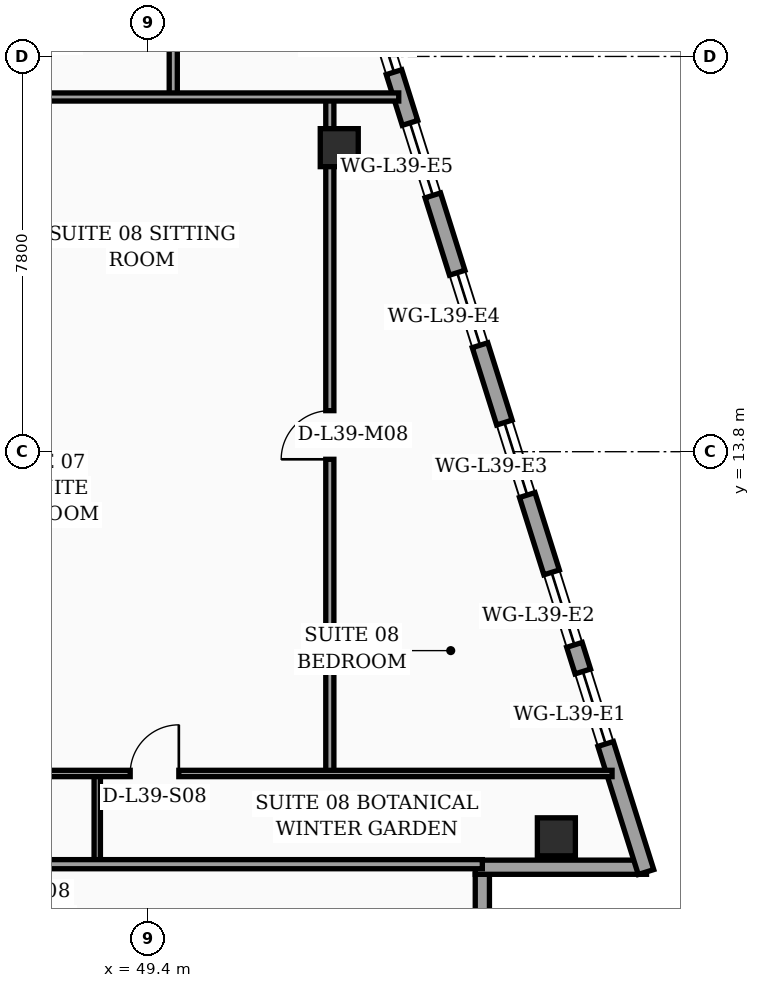
"""IFC4 building model, lengths in metres.
Left out: names, types, materials, properties, quantities, classifications, styles, units other than length and angle.
Written with IfcOpenShell. Run it as: python <this file> out.ifc"""

import sys

from ifc_helpers import new_model, si_unit, direction, frame, frame_2d, origin, origin_2d, place, context, subcontext, project, spatial, rectangle, hollow_rectangle, extrude, element, fill, save


model = new_model("IFC4")
c1 = context("Model", 3, precision=1e-05, world=origin(), true_north=direction((0.0, 1.0)))
c2 = subcontext(c1, "Body", "Model", "MODEL_VIEW")
j1 = project(units=[si_unit("LENGTHUNIT", "METRE"), si_unit("PLANEANGLEUNIT", "RADIAN")], contexts=[c1])
p1 = place(None, origin())
s1 = spatial("IfcSite", under=j1, at=p1, CompositionType="ELEMENT")
p2 = place(p1, origin())
s2 = spatial("IfcBuilding", under=s1, at=p2, CompositionType="ELEMENT")
p3 = place(p2, frame((0.0, 0.0, 159.9)))
s3 = spatial("IfcBuildingStorey", under=s2, at=p3, CompositionType="ELEMENT", Elevation=159.9)
for number, where, z_axis, x_axis in (
    (1, (57.461, 6.2, 0.0), (0.0, 0.0, 1.0), (1.0, 0.0, 0.0)),
    (2, (53.176, 19.8, 0.0), (0.0, 0.0, 1.0), (1.0, 0.0, 0.0)),
):
    element("IfcColumn", number, at=place(p3, frame(where, z_axis=z_axis, x_axis=x_axis)), inside=s3, PredefinedType="COLUMN", context=c2, shape_type="SweptSolid", body=[
        extrude(hollow_rectangle(XDim=0.75, YDim=0.75, WallThickness=0.032, at=origin_2d()), origin(), (0.0, 0.0, 1.0), 3.56),
    ])
p4 = place(p3, frame((56.0, 2.52, 0.0), z_axis=(0.0, 0.0, 1.0), x_axis=(0.0, 1.0, 0.0)))
e3 = element("IfcWall", 3, at=p4, inside=s3, PredefinedType="SOLIDWALL", context=c2, shape_type="SweptSolid", body=[
    extrude(rectangle(XDim=2.94, YDim=0.28, at=frame_2d((1.47, 0.0))), origin(), (0.0, 0.0, 1.0), 3.04),
])
p5 = place(p3, frame((55.86, 5.6, 0.0), z_axis=(0.0, 0.0, 1.0), x_axis=(1.0, 0.0, 0.0)))
e4 = element("IfcWall", 4, at=p5, inside=s3, PredefinedType="SOLIDWALL", context=c2, shape_type="SweptSolid", body=[
    extrude(rectangle(XDim=3.38, YDim=0.28, at=frame_2d((1.69, 0.0))), origin(), (0.0, 0.0, 1.0), 3.04),
])
p6 = place(p3, frame((59.23, 5.505, 0.0), z_axis=(0.0, 0.0, 1.0), x_axis=(-0.300509063924, 0.953778958931, 0.0)))
e5 = element("IfcWall", 5, at=p6, inside=s3, PredefinedType="SOLIDWALL", context=c2, shape_type="SweptSolid", body=[
    extrude(rectangle(XDim=30.814, YDim=0.32, at=frame_2d((15.407, 0.0))), origin(), (0.0, 0.0, 1.0), 3.56),
])
p7 = place(p6, frame((18.796, 0.0, 0.0)))
e6 = element("IfcOpeningElement", 6, at=p7, cuts=e5, PredefinedType="OPENING", context=c2, shape_type="SweptSolid", body=[
    extrude(rectangle(XDim=1.4, YDim=2.25, at=frame_2d((0.7, 1.125))), frame((0.0, 0.17, 0.0), z_axis=(0.0, -1.0, 0.0), x_axis=(1.0, 0.0, 0.0)), (0.0, 0.0, 1.0), 0.34),
])
p8 = place(p6, frame((2.65, 0.0, 0.75)))
e7 = element("IfcOpeningElement", 7, at=p8, cuts=e5, PredefinedType="OPENING", context=c2, shape_type="SweptSolid", body=[
    extrude(rectangle(XDim=1.5, YDim=1.6, at=frame_2d((0.75, 0.8))), frame((0.0, 0.17, 0.0), z_axis=(0.0, -1.0, 0.0), x_axis=(1.0, 0.0, 0.0)), (0.0, 0.0, 1.0), 0.34),
])
p9 = place(p6, frame((4.7, 0.0, 0.75)))
e8 = element("IfcOpeningElement", 8, at=p9, cuts=e5, PredefinedType="OPENING", context=c2, shape_type="SweptSolid", body=[
    extrude(rectangle(XDim=1.5, YDim=1.6, at=frame_2d((0.75, 0.8))), frame((0.0, 0.17, 0.0), z_axis=(0.0, -1.0, 0.0), x_axis=(1.0, 0.0, 0.0)), (0.0, 0.0, 1.0), 0.34),
])
p10 = place(p6, frame((7.8, 0.0, 0.75)))
e9 = element("IfcOpeningElement", 9, at=p10, cuts=e5, PredefinedType="OPENING", context=c2, shape_type="SweptSolid", body=[
    extrude(rectangle(XDim=1.5, YDim=1.6, at=frame_2d((0.75, 0.8))), frame((0.0, 0.17, 0.0), z_axis=(0.0, -1.0, 0.0), x_axis=(1.0, 0.0, 0.0)), (0.0, 0.0, 1.0), 0.34),
])
p11 = place(p6, frame((10.9, 0.0, 0.75)))
e10 = element("IfcOpeningElement", 10, at=p11, cuts=e5, PredefinedType="OPENING", context=c2, shape_type="SweptSolid", body=[
    extrude(rectangle(XDim=1.5, YDim=1.6, at=frame_2d((0.75, 0.8))), frame((0.0, 0.17, 0.0), z_axis=(0.0, -1.0, 0.0), x_axis=(1.0, 0.0, 0.0)), (0.0, 0.0, 1.0), 0.34),
])
p12 = place(p6, frame((14.0, 0.0, 0.75)))
e11 = element("IfcOpeningElement", 11, at=p12, cuts=e5, PredefinedType="OPENING", context=c2, shape_type="SweptSolid", body=[
    extrude(rectangle(XDim=1.5, YDim=1.6, at=frame_2d((0.75, 0.8))), frame((0.0, 0.17, 0.0), z_axis=(0.0, -1.0, 0.0), x_axis=(1.0, 0.0, 0.0)), (0.0, 0.0, 1.0), 0.34),
])
p13 = place(p6, frame((16.55, 0.0, 0.75)))
e12 = element("IfcOpeningElement", 12, at=p13, cuts=e5, PredefinedType="OPENING", context=c2, shape_type="SweptSolid", body=[
    extrude(rectangle(XDim=1.5, YDim=1.6, at=frame_2d((0.75, 0.8))), frame((0.0, 0.17, 0.0), z_axis=(0.0, -1.0, 0.0), x_axis=(1.0, 0.0, 0.0)), (0.0, 0.0, 1.0), 0.34),
])
p14 = place(p6, frame((20.75, 0.0, 0.75)))
e13 = element("IfcOpeningElement", 13, at=p14, cuts=e5, PredefinedType="OPENING", context=c2, shape_type="SweptSolid", body=[
    extrude(rectangle(XDim=1.5, YDim=1.6, at=frame_2d((0.75, 0.8))), frame((0.0, 0.17, 0.0), z_axis=(0.0, -1.0, 0.0), x_axis=(1.0, 0.0, 0.0)), (0.0, 0.0, 1.0), 0.34),
])
p15 = place(p6, frame((26.4, 0.0, 0.75)))
e14 = element("IfcOpeningElement", 14, at=p15, cuts=e5, PredefinedType="OPENING", context=c2, shape_type="SweptSolid", body=[
    extrude(rectangle(XDim=1.5, YDim=1.6, at=frame_2d((0.75, 0.8))), frame((0.0, 0.17, 0.0), z_axis=(0.0, -1.0, 0.0), x_axis=(1.0, 0.0, 0.0)), (0.0, 0.0, 1.0), 0.34),
])
p16 = place(p3, frame((48.4, 5.66, 0.0), z_axis=(0.0, 0.0, 1.0), x_axis=(0.0, 1.0, 0.0)))
e15 = element("IfcWall", 15, at=p16, inside=s3, PredefinedType="PARTITIONING", context=c2, shape_type="SweptSolid", body=[
    extrude(rectangle(XDim=1.79, YDim=0.125, at=frame_2d((0.895, 0.0))), origin(), (0.0, 0.0, 1.0), 2.94),
])
p17 = place(p3, frame((52.99, 7.45, 0.0), z_axis=(0.0, 0.0, 1.0), x_axis=(0.0, 1.0, 0.0)))
e16 = element("IfcWall", 16, at=p17, inside=s3, PredefinedType="PARTITIONING", context=c2, shape_type="SweptSolid", body=[
    extrude(rectangle(XDim=13.35, YDim=0.16, at=frame_2d((6.675, 0.0))), origin(), (0.0, 0.0, 1.0), 2.94),
])
p18 = place(p17, frame((6.2, 0.0, 0.0)))
e17 = element("IfcOpeningElement", 17, at=p18, cuts=e16, PredefinedType="OPENING", context=c2, shape_type="SweptSolid", body=[
    extrude(rectangle(XDim=0.96, YDim=2.2, at=frame_2d((0.48, 1.1))), frame((0.0, 0.09, 0.0), z_axis=(0.0, -1.0, 0.0), x_axis=(1.0, 0.0, 0.0)), (0.0, 0.0, 1.0), 0.18),
])
p19 = place(p3, frame((45.45, 7.45, 0.0), z_axis=(0.0, 0.0, 1.0), x_axis=(1.0, 0.0, 0.0)))
e18 = element("IfcWall", 18, at=p19, inside=s3, PredefinedType="PARTITIONING", context=c2, shape_type="SweptSolid", body=[
    extrude(rectangle(XDim=13.11, YDim=0.125, at=frame_2d((6.555, 0.0))), origin(), (0.0, 0.0, 1.0), 2.94),
])
p20 = place(p19, frame((0.5, 0.0, 0.0)))
e19 = element("IfcOpeningElement", 19, at=p20, cuts=e18, PredefinedType="OPENING", context=c2, shape_type="SweptSolid", body=[
    extrude(rectangle(XDim=0.9, YDim=2.15, at=frame_2d((0.45, 1.075))), frame((0.0, 0.073, 0.0), z_axis=(0.0, -1.0, 0.0), x_axis=(1.0, 0.0, 0.0)), (0.0, 0.0, 1.0), 0.145),
])
p21 = place(p19, frame((3.6, 0.0, 0.0)))
e20 = element("IfcOpeningElement", 20, at=p21, cuts=e18, PredefinedType="OPENING", context=c2, shape_type="SweptSolid", body=[
    extrude(rectangle(XDim=0.96, YDim=2.2, at=frame_2d((0.48, 1.1))), frame((0.0, 0.073, 0.0), z_axis=(0.0, -1.0, 0.0), x_axis=(1.0, 0.0, 0.0)), (0.0, 0.0, 1.0), 0.145),
])
p22 = place(p3, frame((45.45, 5.66, 0.0), z_axis=(0.0, 0.0, 1.0), x_axis=(1.0, 0.0, 0.0)))
e21 = element("IfcWall", 21, at=p22, inside=s3, PredefinedType="PARTITIONING", context=c2, shape_type="SweptSolid", body=[
    extrude(rectangle(XDim=10.55, YDim=0.18, at=frame_2d((5.275, 0.0))), origin(), (0.0, 0.0, 1.0), 2.94),
])
p23 = place(p3, frame((49.9, 20.8, 0.0), z_axis=(0.0, 0.0, 1.0), x_axis=(0.0, 1.0, 0.0)))
e22 = element("IfcWall", 22, at=p23, inside=s3, PredefinedType="PARTITIONING", context=c2, shape_type="SweptSolid", body=[
    extrude(rectangle(XDim=7.35, YDim=0.16, at=frame_2d((3.675, 0.0))), origin(), (0.0, 0.0, 1.0), 3.04),
])
p24 = place(p23, frame((3.19, 0.0, 0.0)))
e23 = element("IfcOpeningElement", 23, at=p24, cuts=e22, PredefinedType="OPENING", context=c2, shape_type="SweptSolid", body=[
    extrude(rectangle(XDim=0.96, YDim=2.2, at=frame_2d((0.48, 1.1))), frame((0.0, 0.09, 0.0), z_axis=(0.0, -1.0, 0.0), x_axis=(1.0, 0.0, 0.0)), (0.0, 0.0, 1.0), 0.18),
])
p25 = place(p3, frame((45.45, 20.8, 0.0), z_axis=(0.0, 0.0, 1.0), x_axis=(1.0, 0.0, 0.0)))
e24 = element("IfcWall", 24, at=p25, inside=s3, PredefinedType="PARTITIONING", context=c2, shape_type="SweptSolid", body=[
    extrude(rectangle(XDim=8.9, YDim=0.16, at=frame_2d((4.45, 0.0))), origin(), (0.0, 0.0, 1.0), 2.94),
])
p26 = place(p8, origin())
e25 = element("IfcWindow", 25, at=p26, inside=s3, PartitioningType="SINGLE_PANEL", PredefinedType="WINDOW", context=c2, shape_type="SweptSolid", body=[
    extrude(rectangle(XDim=1.5, YDim=1.6, at=frame_2d((0.75, 0.8))), frame((0.0, 0.03, 0.0), z_axis=(0.0, -1.0, 0.0), x_axis=(1.0, 0.0, 0.0)), (0.0, 0.0, 1.0), 0.06),
])
fill(e7, e25)
p27 = place(p9, origin())
e26 = element("IfcWindow", 26, at=p27, inside=s3, PartitioningType="SINGLE_PANEL", PredefinedType="WINDOW", context=c2, shape_type="SweptSolid", body=[
    extrude(rectangle(XDim=1.5, YDim=1.6, at=frame_2d((0.75, 0.8))), frame((0.0, 0.03, 0.0), z_axis=(0.0, -1.0, 0.0), x_axis=(1.0, 0.0, 0.0)), (0.0, 0.0, 1.0), 0.06),
])
fill(e8, e26)
p28 = place(p10, origin())
e27 = element("IfcWindow", 27, at=p28, inside=s3, PartitioningType="SINGLE_PANEL", PredefinedType="WINDOW", context=c2, shape_type="SweptSolid", body=[
    extrude(rectangle(XDim=1.5, YDim=1.6, at=frame_2d((0.75, 0.8))), frame((0.0, 0.03, 0.0), z_axis=(0.0, -1.0, 0.0), x_axis=(1.0, 0.0, 0.0)), (0.0, 0.0, 1.0), 0.06),
])
fill(e9, e27)
p29 = place(p11, origin())
e28 = element("IfcWindow", 28, at=p29, inside=s3, PartitioningType="SINGLE_PANEL", PredefinedType="WINDOW", context=c2, shape_type="SweptSolid", body=[
    extrude(rectangle(XDim=1.5, YDim=1.6, at=frame_2d((0.75, 0.8))), frame((0.0, 0.03, 0.0), z_axis=(0.0, -1.0, 0.0), x_axis=(1.0, 0.0, 0.0)), (0.0, 0.0, 1.0), 0.06),
])
fill(e10, e28)
p30 = place(p12, origin())
e29 = element("IfcWindow", 29, at=p30, inside=s3, PartitioningType="SINGLE_PANEL", PredefinedType="WINDOW", context=c2, shape_type="SweptSolid", body=[
    extrude(rectangle(XDim=1.5, YDim=1.6, at=frame_2d((0.75, 0.8))), frame((0.0, 0.03, 0.0), z_axis=(0.0, -1.0, 0.0), x_axis=(1.0, 0.0, 0.0)), (0.0, 0.0, 1.0), 0.06),
])
fill(e11, e29)
p31 = place(p13, origin())
e30 = element("IfcWindow", 30, at=p31, inside=s3, PartitioningType="SINGLE_PANEL", PredefinedType="WINDOW", context=c2, shape_type="SweptSolid", body=[
    extrude(rectangle(XDim=1.5, YDim=1.6, at=frame_2d((0.75, 0.8))), frame((0.0, 0.03, 0.0), z_axis=(0.0, -1.0, 0.0), x_axis=(1.0, 0.0, 0.0)), (0.0, 0.0, 1.0), 0.06),
])
fill(e12, e30)
p32 = place(p18, origin())
e31 = element("IfcDoor", 31, at=p32, inside=s3, OperationType="SINGLE_SWING_LEFT", PredefinedType="DOOR", context=c2, shape_type="SweptSolid", body=[
    extrude(rectangle(XDim=0.96, YDim=2.2, at=frame_2d((0.48, 1.1))), frame((0.0, 0.025, 0.0), z_axis=(0.0, -1.0, 0.0), x_axis=(1.0, 0.0, 0.0)), (0.0, 0.0, 1.0), 0.05),
])
fill(e17, e31)
p33 = place(p21, origin())
e32 = element("IfcDoor", 32, at=p33, inside=s3, OperationType="SINGLE_SWING_RIGHT", PredefinedType="DOOR", context=c2, shape_type="SweptSolid", body=[
    extrude(rectangle(XDim=0.96, YDim=2.2, at=frame_2d((0.48, 1.1))), frame((0.0, 0.025, 0.0), z_axis=(0.0, -1.0, 0.0), x_axis=(1.0, 0.0, 0.0)), (0.0, 0.0, 1.0), 0.05),
])
fill(e20, e32)
save(model, sys.argv[1])
